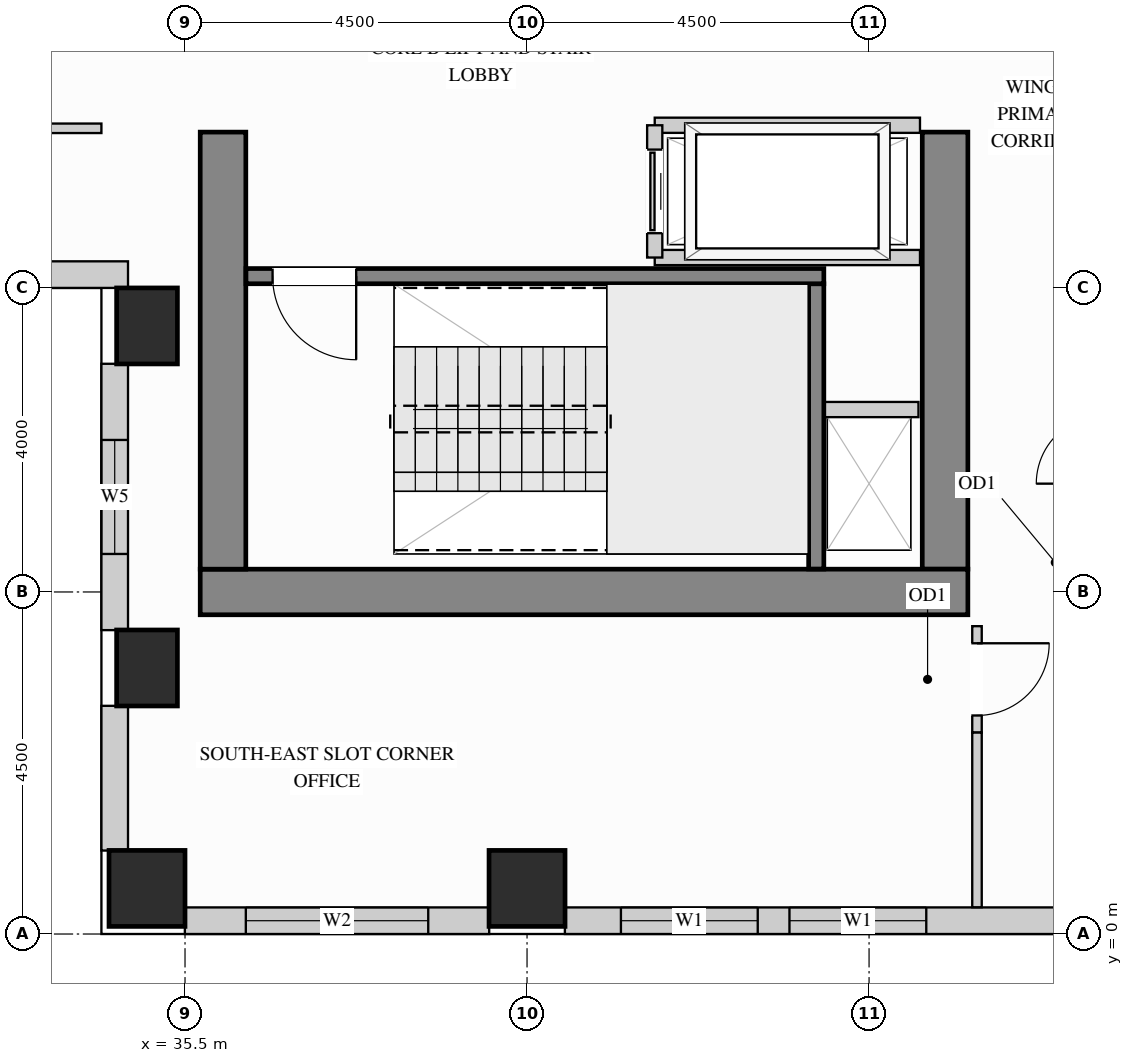
"""IFC4 building model, lengths in metres.
Left out: names, types, materials, properties, quantities, classifications, styles, units other than length and angle.
Written with IfcOpenShell. Run it as: python <this file> out.ifc"""

import sys

from ifc_helpers import new_model, si_unit, direction, frame, frame_2d, origin, origin_2d, place, context, subcontext, project, spatial, rectangle, extrude, source, transform, mapped, element, fill, save


model = new_model("IFC4")
c1 = context("Model", 3, precision=1e-05, world=origin(), true_north=direction((0.0, 1.0)))
c2 = subcontext(c1, "Body", "Model", "MODEL_VIEW")
j1 = project(units=[si_unit("LENGTHUNIT", "METRE"), si_unit("PLANEANGLEUNIT", "RADIAN")], contexts=[c1])
p1 = place(None, origin())
s1 = spatial("IfcSite", under=j1, at=p1, CompositionType="ELEMENT")
p2 = place(p1, origin())
s2 = spatial("IfcBuilding", under=s1, at=p2, CompositionType="ELEMENT")
p3 = place(p2, frame((0.0, 0.0, 186.3)))
s3 = spatial("IfcBuildingStorey", under=s2, at=p3, CompositionType="ELEMENT", Elevation=186.3)
m1 = source(origin(), c2, "Body", "SweptSolid", [
    extrude(rectangle(XDim=0.8, YDim=1.0, at=origin_2d()), origin(), (0.0, 0.0, 1.0), 3.4),
])
for number, where, z_axis, x_axis in (
    (1, (35.0, 3.5, 0.0), (0.0, 0.0, 1.0), (1.0, 0.0, 0.0)),
    (2, (35.0, 8.0, 0.0), (0.0, 0.0, 1.0), (1.0, 0.0, 0.0)),
):
    element("IfcColumn", number, at=place(p3, frame(where, z_axis=z_axis, x_axis=x_axis)), inside=s3, PredefinedType="COLUMN", context=c2, shape_type="MappedRepresentation", body=[
        mapped(m1, transform((0.0, 0.0, 0.0), x_axis=(1.0, 0.0, 0.0), y_axis=(0.0, 1.0, 0.0), z_axis=(0.0, 0.0, 1.0))),
    ])
m2 = source(origin(), c2, "Body", "SweptSolid", [
    extrude(rectangle(XDim=1.0, YDim=1.0, at=origin_2d()), origin(), (0.0, 0.0, 1.0), 3.4),
])
for number, where, z_axis, x_axis in (
    (3, (35.0, 0.6, 0.0), (0.0, 0.0, 1.0), (1.0, 0.0, 0.0)),
    (4, (40.0, 0.6, 0.0), (0.0, 0.0, 1.0), (1.0, 0.0, 0.0)),
):
    element("IfcColumn", number, at=place(p3, frame(where, z_axis=z_axis, x_axis=x_axis)), inside=s3, PredefinedType="COLUMN", context=c2, shape_type="MappedRepresentation", body=[
        mapped(m2, transform((0.0, 0.0, 0.0), x_axis=(1.0, 0.0, 0.0), y_axis=(0.0, 1.0, 0.0), z_axis=(0.0, 0.0, 1.0))),
    ])
m3 = source(origin(), c2, "Body", "SweptSolid", [
    extrude(rectangle(XDim=5.75, YDim=0.6, at=frame_2d((2.875, 0.0))), origin(), (0.0, 0.0, 1.0), 3.4),
])
p4 = place(p3, frame((45.5, 4.8, 0.0), z_axis=(0.0, 0.0, 1.0), x_axis=(0.0, 1.0, 0.0)))
e5 = element("IfcWall", 5, at=p4, inside=s3, PredefinedType="SHEAR", context=c2, shape_type="MappedRepresentation", body=[
    mapped(m3, transform((0.0, 0.0, 0.0), x_axis=(1.0, 0.0, 0.0), y_axis=(0.0, 1.0, 0.0), z_axis=(0.0, 0.0, 1.0))),
])
m4 = source(origin(), c2, "Body", "SweptSolid", [
    extrude(rectangle(XDim=10.1, YDim=0.6, at=frame_2d((5.05, 0.0))), origin(), (0.0, 0.0, 1.0), 3.4),
])
p5 = place(p3, frame((35.7, 4.5, 0.0), z_axis=(0.0, 0.0, 1.0), x_axis=(1.0, 0.0, 0.0)))
e6 = element("IfcWall", 6, at=p5, inside=s3, PredefinedType="SHEAR", context=c2, shape_type="MappedRepresentation", body=[
    mapped(m4, transform((0.0, 0.0, 0.0), x_axis=(1.0, 0.0, 0.0), y_axis=(0.0, 1.0, 0.0), z_axis=(0.0, 0.0, 1.0))),
])
p6 = place(p3, frame((36.0, 4.8, 0.0), z_axis=(0.0, 0.0, 1.0), x_axis=(0.0, 1.0, 0.0)))
e7 = element("IfcWall", 7, at=p6, inside=s3, PredefinedType="SHEAR", context=c2, shape_type="MappedRepresentation", body=[
    mapped(m3, transform((0.0, 0.0, 0.0), x_axis=(1.0, 0.0, 0.0), y_axis=(0.0, 1.0, 0.0), z_axis=(0.0, 0.0, 1.0))),
])
p7 = place(p3, frame((30.898, 8.675, 0.0), z_axis=(0.0, 0.0, 1.0), x_axis=(1.0, 0.0, 0.0)))
e8 = element("IfcWall", 8, at=p7, inside=s3, PredefinedType="SOLIDWALL", context=c2, shape_type="SweptSolid", body=[
    extrude(rectangle(XDim=3.852, YDim=0.35, at=frame_2d((1.926, 0.0))), origin(), (0.0, 0.0, 1.0), 3.385),
])
p8 = place(p7, frame((1.176, 0.0, 0.78)))
e9 = element("IfcOpeningElement", 9, at=p8, cuts=e8, PredefinedType="OPENING", context=c2, shape_type="SweptSolid", body=[
    extrude(rectangle(XDim=1.5, YDim=2.0, at=frame_2d((0.75, 1.0))), frame((0.0, 0.185, 0.0), z_axis=(0.0, -1.0, 0.0), x_axis=(1.0, 0.0, 0.0)), (0.0, 0.0, 1.0), 0.37),
])
p9 = place(p3, frame((34.575, 7.502, 0.0), z_axis=(0.0, 0.0, 1.0), x_axis=(0.0, -1.0, 0.0)))
e10 = element("IfcWall", 10, at=p9, inside=s3, PredefinedType="SOLIDWALL", context=c2, shape_type="SweptSolid", body=[
    extrude(rectangle(XDim=3.504, YDim=0.35, at=frame_2d((1.752, 0.0))), origin(), (0.0, 0.0, 1.0), 2.612),
])
p10 = place(p9, frame((1.002, 0.0, 0.78)))
e11 = element("IfcOpeningElement", 11, at=p10, cuts=e10, PredefinedType="OPENING", context=c2, shape_type="SweptSolid", body=[
    extrude(rectangle(XDim=1.5, YDim=1.652, at=frame_2d((0.75, 0.826))), frame((0.0, 0.185, 0.0), z_axis=(0.0, -1.0, 0.0), x_axis=(1.0, 0.0, 0.0)), (0.0, 0.0, 1.0), 0.37),
])
m5 = source(origin(), c2, "Body", "SweptSolid", [
    extrude(rectangle(XDim=1.904, YDim=0.35, at=frame_2d((0.952, 0.0))), origin(), (0.0, 0.0, 1.0), 2.612),
])
p11 = place(p3, frame((34.575, 3.002, 0.0), z_axis=(0.0, 0.0, 1.0), x_axis=(0.0, -1.0, 0.0)))
e12 = element("IfcWall", 12, at=p11, inside=s3, PredefinedType="SOLIDWALL", context=c2, shape_type="MappedRepresentation", body=[
    mapped(m5, transform((0.0, 0.0, 0.0), x_axis=(1.0, 0.0, 0.0), y_axis=(0.0, 1.0, 0.0), z_axis=(0.0, 0.0, 1.0))),
])
p12 = place(p3, frame((35.498, 0.175, 0.0), z_axis=(0.0, 0.0, 1.0), x_axis=(1.0, 0.0, 0.0)))
e13 = element("IfcWall", 13, at=p12, inside=s3, PredefinedType="SOLIDWALL", context=c2, shape_type="SweptSolid", body=[
    extrude(rectangle(XDim=4.004, YDim=0.35, at=frame_2d((2.002, 0.0))), origin(), (0.0, 0.0, 1.0), 2.612),
])
p13 = place(p12, frame((0.802, 0.0, 0.78)))
e14 = element("IfcOpeningElement", 14, at=p13, cuts=e13, PredefinedType="OPENING", context=c2, shape_type="SweptSolid", body=[
    extrude(rectangle(XDim=2.4, YDim=1.652, at=frame_2d((1.2, 0.826))), frame((0.0, 0.185, 0.0), z_axis=(0.0, -1.0, 0.0), x_axis=(1.0, 0.0, 0.0)), (0.0, 0.0, 1.0), 0.37),
])
p14 = place(p3, frame((40.498, 0.175, 0.0), z_axis=(0.0, 0.0, 1.0), x_axis=(1.0, 0.0, 0.0)))
e15 = element("IfcWall", 15, at=p14, inside=s3, PredefinedType="SOLIDWALL", context=c2, shape_type="SweptSolid", body=[
    extrude(rectangle(XDim=6.604, YDim=0.35, at=frame_2d((3.302, 0.0))), origin(), (0.0, 0.0, 1.0), 2.612),
])
p15 = place(p14, frame((0.737, 0.0, 0.78)))
e16 = element("IfcOpeningElement", 16, at=p15, cuts=e15, PredefinedType="OPENING", context=c2, shape_type="SweptSolid", body=[
    extrude(rectangle(XDim=1.8, YDim=1.652, at=frame_2d((0.9, 0.826))), frame((0.0, 0.185, 0.0), z_axis=(0.0, -1.0, 0.0), x_axis=(1.0, 0.0, 0.0)), (0.0, 0.0, 1.0), 0.37),
])
p16 = place(p14, frame((2.955, 0.0, 0.78)))
e17 = element("IfcOpeningElement", 17, at=p16, cuts=e15, PredefinedType="OPENING", context=c2, shape_type="SweptSolid", body=[
    extrude(rectangle(XDim=1.8, YDim=1.652, at=frame_2d((0.9, 0.826))), frame((0.0, 0.185, 0.0), z_axis=(0.0, -1.0, 0.0), x_axis=(1.0, 0.0, 0.0)), (0.0, 0.0, 1.0), 0.37),
])
p17 = place(p3, frame((45.92, 2.65, 0.0), z_axis=(0.0, 0.0, 1.0), x_axis=(0.0, 1.0, 0.0)))
e18 = element("IfcWall", 18, at=p17, inside=s3, PredefinedType="PARTITIONING", context=c2, shape_type="SweptSolid", body=[
    extrude(rectangle(XDim=1.4, YDim=0.125, at=frame_2d((0.7, 0.0))), origin(), (0.0, 0.0, 1.0), 3.385),
])
p18 = place(p17, frame((0.225, 0.0, 0.0)))
e19 = element("IfcOpeningElement", 19, at=p18, cuts=e18, PredefinedType="OPENING", context=c2, shape_type="SweptSolid", body=[
    extrude(rectangle(XDim=0.95, YDim=2.15, at=frame_2d((0.475, 1.075))), frame((0.0, 0.073, 0.0), z_axis=(0.0, -1.0, 0.0), x_axis=(1.0, 0.0, 0.0)), (0.0, 0.0, 1.0), 0.145),
])
m6 = source(origin(), c2, "Body", "SweptSolid", [
    extrude(rectangle(XDim=2.298, YDim=0.125, at=frame_2d((1.149, 0.0))), origin(), (0.0, 0.0, 1.0), 3.385),
])
p19 = place(p3, frame((45.92, 0.352, 0.0), z_axis=(0.0, 0.0, 1.0), x_axis=(0.0, 1.0, 0.0)))
e20 = element("IfcWall", 20, at=p19, inside=s3, PredefinedType="PARTITIONING", context=c2, shape_type="MappedRepresentation", body=[
    mapped(m6, transform((0.0, 0.0, 0.0), x_axis=(1.0, 0.0, 0.0), y_axis=(0.0, 1.0, 0.0), z_axis=(0.0, 0.0, 1.0))),
])
p20 = place(p3, frame((29.85, 10.6, 0.0), z_axis=(0.0, 0.0, 1.0), x_axis=(1.0, 0.0, 0.0)))
e21 = element("IfcWall", 21, at=p20, inside=s3, PredefinedType="PARTITIONING", context=c2, shape_type="SweptSolid", body=[
    extrude(rectangle(XDim=4.55, YDim=0.125, at=frame_2d((2.275, 0.0))), origin(), (0.0, 0.0, 1.0), 3.385),
])
p21 = place(p20, frame((1.8, 0.0, 0.0)))
e22 = element("IfcOpeningElement", 22, at=p21, cuts=e21, PredefinedType="OPENING", context=c2, shape_type="SweptSolid", body=[
    extrude(rectangle(XDim=0.95, YDim=2.15, at=frame_2d((0.475, 1.075))), frame((0.0, 0.073, 0.0), z_axis=(0.0, -1.0, 0.0), x_axis=(1.0, 0.0, 0.0)), (0.0, 0.0, 1.0), 0.145),
])
m7 = source(origin(), c2, "Body", "SweptSolid", [
    extrude(rectangle(XDim=1.3, YDim=0.2, at=frame_2d((0.65, 0.0))), origin(), (0.0, 0.0, 1.0), 3.385),
])
p22 = place(p3, frame((43.85, 6.9, 0.0), z_axis=(0.0, 0.0, 1.0), x_axis=(1.0, 0.0, 0.0)))
e23 = element("IfcWall", 23, at=p22, inside=s3, PredefinedType="PARTITIONING", context=c2, shape_type="MappedRepresentation", body=[
    mapped(m7, transform((0.0, 0.0, 0.0), x_axis=(1.0, 0.0, 0.0), y_axis=(0.0, 1.0, 0.0), z_axis=(0.0, 0.0, 1.0))),
])
m8 = source(origin(), c2, "Body", "SweptSolid", [
    extrude(rectangle(XDim=3.49, YDim=0.2, at=frame_2d((1.745, 0.0))), origin(), (0.0, 0.0, 1.0), 3.385),
])
for number, where, z_axis, x_axis in (
    (24, (41.68, 10.64, 0.0), (0.0, 0.0, 1.0), (1.0, 0.0, 0.0)),
    (25, (41.68, 8.9, 0.0), (0.0, 0.0, 1.0), (1.0, 0.0, 0.0)),
):
    element("IfcWall", number, at=place(p3, frame(where, z_axis=z_axis, x_axis=x_axis)), inside=s3, PredefinedType="PARTITIONING", context=c2, shape_type="MappedRepresentation", body=[
        mapped(m8, transform((0.0, 0.0, 0.0), x_axis=(1.0, 0.0, 0.0), y_axis=(0.0, 1.0, 0.0), z_axis=(0.0, 0.0, 1.0))),
    ])
p23 = place(p3, frame((41.68, 8.9, 0.0), z_axis=(0.0, 0.0, 1.0), x_axis=(0.0, 1.0, 0.0)))
e26 = element("IfcWall", 26, at=p23, inside=s3, PredefinedType="PARTITIONING", context=c2, shape_type="SweptSolid", body=[
    extrude(rectangle(XDim=1.74, YDim=0.2, at=frame_2d((0.87, 0.0))), origin(), (0.0, 0.0, 1.0), 3.385),
])
p24 = place(p23, frame((0.32, 0.0, 0.0)))
e27 = element("IfcOpeningElement", 27, at=p24, cuts=e26, PredefinedType="OPENING", context=c2, shape_type="SweptSolid", body=[
    extrude(rectangle(XDim=1.1, YDim=2.2, at=frame_2d((0.55, 1.1))), frame((0.0, 0.11, 0.0), z_axis=(0.0, -1.0, 0.0), x_axis=(1.0, 0.0, 0.0)), (0.0, 0.0, 1.0), 0.22),
])
m9 = source(origin(), c2, "Body", "SweptSolid", [
    extrude(rectangle(XDim=3.753, YDim=0.2, at=frame_2d((1.876, 0.0))), origin(), (0.0, 0.0, 1.0), 3.4),
])
p25 = place(p3, frame((43.805, 4.802, 0.0), z_axis=(0.0, 0.0, 1.0), x_axis=(0.0, 1.0, 0.0)))
e28 = element("IfcWall", 28, at=p25, inside=s3, PredefinedType="SHEAR", context=c2, shape_type="MappedRepresentation", body=[
    mapped(m9, transform((0.0, 0.0, 0.0), x_axis=(1.0, 0.0, 0.0), y_axis=(0.0, 1.0, 0.0), z_axis=(0.0, 0.0, 1.0))),
])
p26 = place(p3, frame((36.302, 8.655, 0.0), z_axis=(0.0, 0.0, 1.0), x_axis=(1.0, 0.0, 0.0)))
e29 = element("IfcWall", 29, at=p26, inside=s3, PredefinedType="SHEAR", context=c2, shape_type="SweptSolid", body=[
    extrude(rectangle(XDim=7.603, YDim=0.2, at=frame_2d((3.802, 0.0))), origin(), (0.0, 0.0, 1.0), 3.4),
])
p27 = place(p26, frame((0.35, 0.0, 0.0)))
e30 = element("IfcOpeningElement", 30, at=p27, cuts=e29, PredefinedType="OPENING", context=c2, shape_type="SweptSolid", body=[
    extrude(rectangle(XDim=1.1, YDim=2.15, at=frame_2d((0.55, 1.075))), frame((0.0, 0.11, 0.0), z_axis=(0.0, -1.0, 0.0), x_axis=(1.0, 0.0, 0.0)), (0.0, 0.0, 1.0), 0.22),
])
m10 = source(origin(), c2, "Body", "SweptSolid", [
    extrude(rectangle(XDim=1.1, YDim=2.2, at=frame_2d((0.55, 1.1))), frame((0.0, 0.025, 0.0), z_axis=(0.0, -1.0, 0.0), x_axis=(1.0, 0.0, 0.0)), (0.0, 0.0, 1.0), 0.05),
])
p28 = place(p24, origin())
e31 = element("IfcDoor", 31, at=p28, inside=s3, OperationType="SLIDING_TO_LEFT", PredefinedType="DOOR", context=c2, shape_type="MappedRepresentation", body=[
    mapped(m10, transform((0.0, 0.0, 0.0), x_axis=(1.0, 0.0, 0.0), y_axis=(0.0, 1.0, 0.0), z_axis=(0.0, 0.0, 1.0))),
])
fill(e27, e31)
m11 = source(origin(), c2, "Body", "SweptSolid", [
    extrude(rectangle(XDim=0.95, YDim=2.15, at=frame_2d((0.475, 1.075))), frame((0.0, 0.025, 0.0), z_axis=(0.0, -1.0, 0.0), x_axis=(1.0, 0.0, 0.0)), (0.0, 0.0, 1.0), 0.05),
])
p29 = place(p18, origin())
e32 = element("IfcDoor", 32, at=p29, inside=s3, OperationType="SINGLE_SWING_RIGHT", PredefinedType="DOOR", context=c2, shape_type="MappedRepresentation", body=[
    mapped(m11, transform((0.0, 0.0, 0.0), x_axis=(1.0, 0.0, 0.0), y_axis=(0.0, 1.0, 0.0), z_axis=(0.0, 0.0, 1.0))),
])
fill(e19, e32)
m12 = source(origin(), c2, "Body", "SweptSolid", [
    extrude(rectangle(XDim=1.1, YDim=2.15, at=frame_2d((0.55, 1.075))), frame((0.0, 0.025, 0.0), z_axis=(0.0, -1.0, 0.0), x_axis=(1.0, 0.0, 0.0)), (0.0, 0.0, 1.0), 0.05),
])
p30 = place(p27, origin())
e33 = element("IfcDoor", 33, at=p30, inside=s3, OperationType="SINGLE_SWING_RIGHT", PredefinedType="DOOR", context=c2, shape_type="MappedRepresentation", body=[
    mapped(m12, transform((0.0, 0.0, 0.0), x_axis=(1.0, 0.0, 0.0), y_axis=(0.0, 1.0, 0.0), z_axis=(0.0, 0.0, 1.0))),
])
fill(e30, e33)
m13 = source(origin(), c2, "Body", "SweptSolid", [
    extrude(rectangle(XDim=1.8, YDim=1.652, at=frame_2d((0.9, 0.826))), frame((0.0, 0.03, 0.0), z_axis=(0.0, -1.0, 0.0), x_axis=(1.0, 0.0, 0.0)), (0.0, 0.0, 1.0), 0.06),
])
p31 = place(p15, origin())
e34 = element("IfcWindow", 34, at=p31, inside=s3, PartitioningType="SINGLE_PANEL", PredefinedType="WINDOW", context=c2, shape_type="MappedRepresentation", body=[
    mapped(m13, transform((0.0, 0.0, 0.0), x_axis=(1.0, 0.0, 0.0), y_axis=(0.0, 1.0, 0.0), z_axis=(0.0, 0.0, 1.0))),
])
fill(e16, e34)
p32 = place(p16, origin())
e35 = element("IfcWindow", 35, at=p32, inside=s3, PartitioningType="SINGLE_PANEL", PredefinedType="WINDOW", context=c2, shape_type="MappedRepresentation", body=[
    mapped(m13, transform((0.0, 0.0, 0.0), x_axis=(1.0, 0.0, 0.0), y_axis=(0.0, 1.0, 0.0), z_axis=(0.0, 0.0, 1.0))),
])
fill(e17, e35)
m14 = source(origin(), c2, "Body", "SweptSolid", [
    extrude(rectangle(XDim=2.4, YDim=1.652, at=frame_2d((1.2, 0.826))), frame((0.0, 0.03, 0.0), z_axis=(0.0, -1.0, 0.0), x_axis=(1.0, 0.0, 0.0)), (0.0, 0.0, 1.0), 0.06),
])
p33 = place(p13, origin())
e36 = element("IfcWindow", 36, at=p33, inside=s3, PartitioningType="SINGLE_PANEL", PredefinedType="WINDOW", context=c2, shape_type="MappedRepresentation", body=[
    mapped(m14, transform((0.0, 0.0, 0.0), x_axis=(1.0, 0.0, 0.0), y_axis=(0.0, 1.0, 0.0), z_axis=(0.0, 0.0, 1.0))),
])
fill(e14, e36)
m15 = source(origin(), c2, "Body", "SweptSolid", [
    extrude(rectangle(XDim=1.5, YDim=1.652, at=frame_2d((0.75, 0.826))), frame((0.0, 0.03, 0.0), z_axis=(0.0, -1.0, 0.0), x_axis=(1.0, 0.0, 0.0)), (0.0, 0.0, 1.0), 0.06),
])
p34 = place(p10, origin())
e37 = element("IfcWindow", 37, at=p34, inside=s3, PartitioningType="SINGLE_PANEL", PredefinedType="WINDOW", context=c2, shape_type="MappedRepresentation", body=[
    mapped(m15, transform((0.0, 0.0, 0.0), x_axis=(1.0, 0.0, 0.0), y_axis=(0.0, 1.0, 0.0), z_axis=(0.0, 0.0, 1.0))),
])
fill(e11, e37)
save(model, sys.argv[1])
